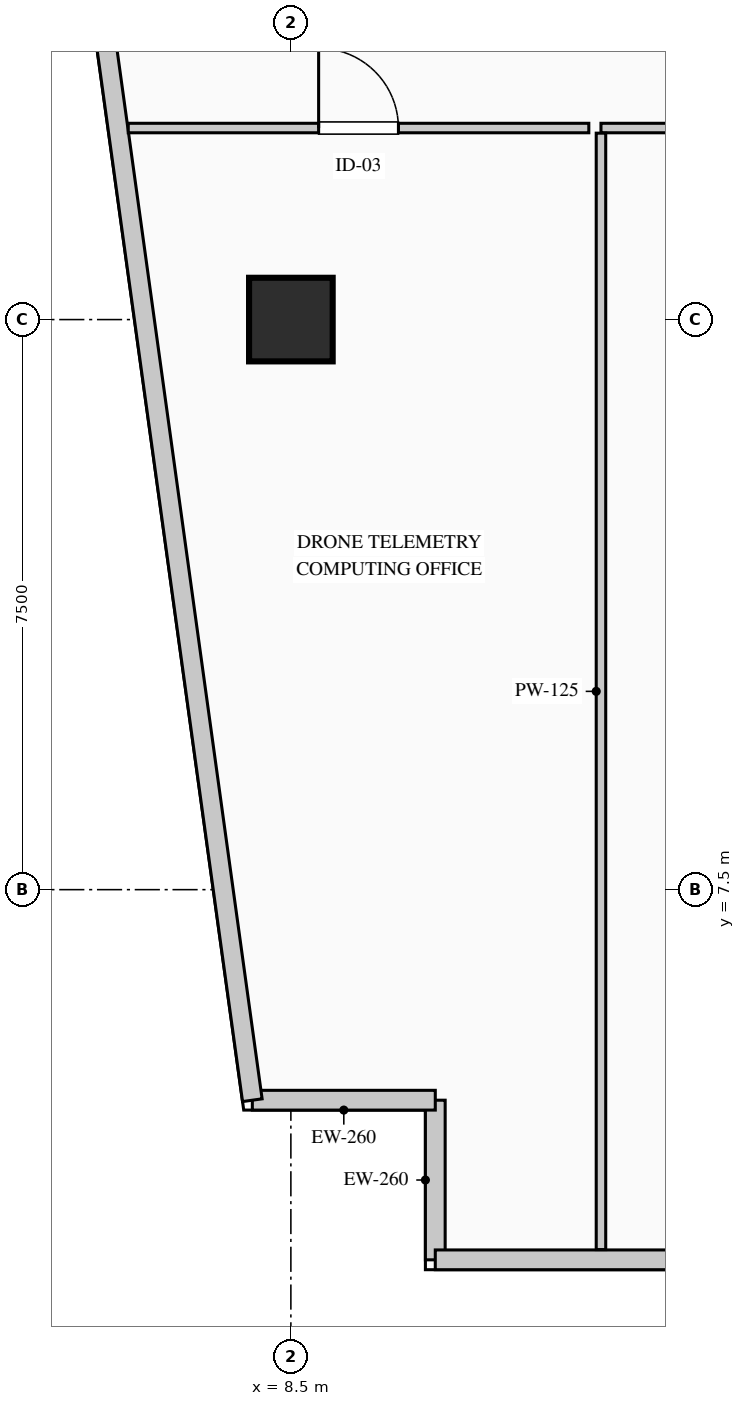
"""IFC4 building model, lengths in metres.
Left out: names, types, materials, properties, quantities, classifications, styles, units other than length and angle.
Written with IfcOpenShell. Run it as: python <this file> out.ifc"""

import sys

from ifc_helpers import new_model, si_unit, direction, frame, frame_2d, origin, origin_2d, place, context, subcontext, project, spatial, rectangle, extrude, element, fill, save


model = new_model("IFC4")
c1 = context("Model", 3, precision=1e-05, world=origin(), true_north=direction((0.0, 1.0)))
c2 = subcontext(c1, "Body", "Model", "MODEL_VIEW")
j1 = project(units=[si_unit("LENGTHUNIT", "METRE"), si_unit("PLANEANGLEUNIT", "RADIAN")], contexts=[c1])
p1 = place(None, origin())
s1 = spatial("IfcSite", under=j1, at=p1, CompositionType="ELEMENT")
p2 = place(p1, origin())
s2 = spatial("IfcBuilding", under=s1, at=p2, CompositionType="ELEMENT")
p3 = place(p2, frame((0.0, 0.0, 123.25)))
s3 = spatial("IfcBuildingStorey", under=s2, at=p3, CompositionType="ELEMENT", Elevation=123.25)
p4 = place(p3, frame((8.5, 15.0, 0.0), z_axis=(0.0, 0.0, 1.0), x_axis=(1.0, 0.0, 0.0)))
e1 = element("IfcColumn", 1, at=p4, inside=s3, PredefinedType="COLUMN", context=c2, shape_type="SweptSolid", body=[
    extrude(rectangle(XDim=1.1, YDim=1.1, at=origin_2d()), origin(), (0.0, 0.0, 1.0), 3.95),
])
p5 = place(p3, frame((10.4, 2.63, 0.0), z_axis=(0.0, 0.0, 1.0), x_axis=(0.0, 1.0, 0.0)))
e2 = element("IfcWall", 2, at=p5, inside=s3, PredefinedType="STANDARD", context=c2, shape_type="SweptSolid", body=[
    extrude(rectangle(XDim=2.1, YDim=0.26, at=frame_2d((1.05, 0.0))), origin(), (0.0, 0.0, 1.0), 3.69),
])
p6 = place(p3, frame((10.4, 4.73, 0.0), z_axis=(0.0, 0.0, 1.0), x_axis=(-1.0, 0.0, 0.0)))
e3 = element("IfcWall", 3, at=p6, inside=s3, PredefinedType="STANDARD", context=c2, shape_type="SweptSolid", body=[
    extrude(rectangle(XDim=2.407, YDim=0.26, at=frame_2d((1.204, 0.0))), origin(), (0.0, 0.0, 1.0), 3.69),
])
p7 = place(p3, frame((7.993, 4.73, 0.0), z_axis=(0.0, 0.0, 1.0), x_axis=(-0.136989009016, 0.990572567462, 0.0)))
e4 = element("IfcWall", 4, at=p7, inside=s3, PredefinedType="STANDARD", context=c2, shape_type="SweptSolid", body=[
    extrude(rectangle(XDim=36.888, YDim=0.26, at=frame_2d((18.444, 0.0))), origin(), (0.0, 0.0, 1.0), 3.69),
])
p8 = place(p7, frame((19.738, 0.0, 0.9)))
e5 = element("IfcOpeningElement", 5, at=p8, cuts=e4, PredefinedType="OPENING", context=c2, shape_type="SweptSolid", body=[
    extrude(rectangle(XDim=2.1, YDim=2.0, at=frame_2d((1.05, 1.0))), frame((0.0, 0.14, 0.0), z_axis=(0.0, -1.0, 0.0), x_axis=(1.0, 0.0, 0.0)), (0.0, 0.0, 1.0), 0.28),
])
p9 = place(p3, frame((24.11, 2.63, 0.0), z_axis=(0.0, 0.0, 1.0), x_axis=(-1.0, 0.0, 0.0)))
e6 = element("IfcWall", 6, at=p9, inside=s3, PredefinedType="STANDARD", context=c2, shape_type="SweptSolid", body=[
    extrude(rectangle(XDim=13.71, YDim=0.26, at=frame_2d((6.855, 0.0))), origin(), (0.0, 0.0, 1.0), 3.69),
])
p10 = place(p9, frame((3.886, 0.0, 0.9)))
e7 = element("IfcOpeningElement", 7, at=p10, cuts=e6, PredefinedType="OPENING", context=c2, shape_type="SweptSolid", body=[
    extrude(rectangle(XDim=2.1, YDim=2.0, at=frame_2d((1.05, 1.0))), frame((0.0, 0.14, 0.0), z_axis=(0.0, -1.0, 0.0), x_axis=(1.0, 0.0, 0.0)), (0.0, 0.0, 1.0), 0.28),
])
p11 = place(p3, frame((12.58, 17.52, 0.0), z_axis=(0.0, 0.0, 1.0), x_axis=(1.0, 0.0, 0.0)))
e8 = element("IfcWall", 8, at=p11, inside=s3, PredefinedType="PARTITIONING", context=c2, shape_type="SweptSolid", body=[
    extrude(rectangle(XDim=10.84, YDim=0.125, at=frame_2d((5.42, 0.0))), origin(), (0.0, 0.0, 1.0), 3.69),
])
p12 = place(p11, frame((4.895, 0.0, 0.0)))
e9 = element("IfcOpeningElement", 9, at=p12, cuts=e8, PredefinedType="OPENING", context=c2, shape_type="SweptSolid", body=[
    extrude(rectangle(XDim=1.05, YDim=2.15, at=frame_2d((0.525, 1.075))), frame((0.0, 0.073, 0.0), z_axis=(0.0, -1.0, 0.0), x_axis=(1.0, 0.0, 0.0)), (0.0, 0.0, 1.0), 0.145),
])
p13 = place(p3, frame((12.58, 2.765, 0.0), z_axis=(0.0, 0.0, 1.0), x_axis=(0.0, 1.0, 0.0)))
e10 = element("IfcWall", 10, at=p13, inside=s3, PredefinedType="PARTITIONING", context=c2, shape_type="SweptSolid", body=[
    extrude(rectangle(XDim=14.688, YDim=0.125, at=frame_2d((7.344, 0.0))), origin(), (0.0, 0.0, 1.0), 3.69),
])
p14 = place(p3, frame((6.36, 17.52, 0.0), z_axis=(0.0, 0.0, 1.0), x_axis=(1.0, 0.0, 0.0)))
e11 = element("IfcWall", 11, at=p14, inside=s3, PredefinedType="PARTITIONING", context=c2, shape_type="SweptSolid", body=[
    extrude(rectangle(XDim=6.06, YDim=0.125, at=frame_2d((3.03, 0.0))), origin(), (0.0, 0.0, 1.0), 3.69),
])
p15 = place(p14, frame((2.505, 0.0, 0.0)))
e12 = element("IfcOpeningElement", 12, at=p15, cuts=e11, PredefinedType="OPENING", context=c2, shape_type="SweptSolid", body=[
    extrude(rectangle(XDim=1.05, YDim=2.15, at=frame_2d((0.525, 1.075))), frame((0.0, 0.073, 0.0), z_axis=(0.0, -1.0, 0.0), x_axis=(1.0, 0.0, 0.0)), (0.0, 0.0, 1.0), 0.145),
])
p16 = place(p15, origin())
e13 = element("IfcDoor", 13, at=p16, inside=s3, OperationType="SINGLE_SWING_LEFT", PredefinedType="DOOR", context=c2, shape_type="SweptSolid", body=[
    extrude(rectangle(XDim=1.05, YDim=2.15, at=frame_2d((0.525, 1.075))), frame((0.0, 0.025, 0.0), z_axis=(0.0, -1.0, 0.0), x_axis=(1.0, 0.0, 0.0)), (0.0, 0.0, 1.0), 0.05),
])
fill(e12, e13)
save(model, sys.argv[1])
